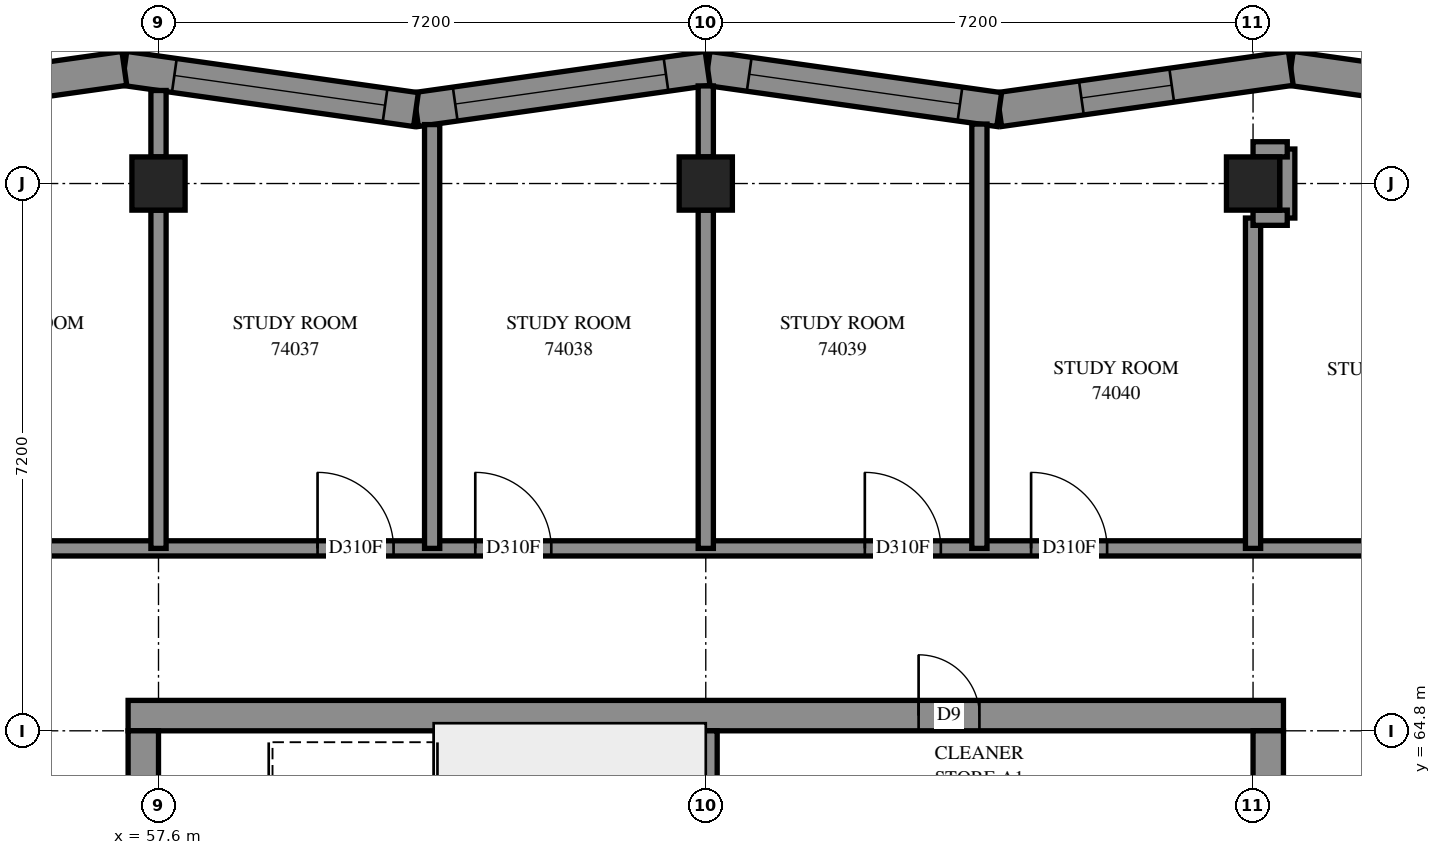
"""IFC4 building model, lengths in metres.
Left out: names, types, materials, properties, quantities, classifications, styles, units other than length and angle.
Written with IfcOpenShell. Run it as: python <this file> out.ifc"""

import sys

from ifc_helpers import new_model, si_unit, direction, frame, frame_2d, origin, origin_2d, place, context, subcontext, project, spatial, polyline, rectangle, outline, extrude, element, fill, save


model = new_model("IFC4")
c1 = context("Model", 3, precision=1e-05, world=origin(), true_north=direction((0.0, 1.0)))
c2 = subcontext(c1, "Body", "Model", "MODEL_VIEW")
j1 = project(units=[si_unit("LENGTHUNIT", "METRE"), si_unit("PLANEANGLEUNIT", "RADIAN")], contexts=[c1])
p1 = place(None, origin())
s1 = spatial("IfcSite", under=j1, at=p1, CompositionType="ELEMENT")
p2 = place(p1, origin())
s2 = spatial("IfcBuilding", under=s1, at=p2, CompositionType="ELEMENT")
p3 = place(p2, frame((0.0, 0.0, 271.0)))
s3 = spatial("IfcBuildingStorey", under=s2, at=p3, CompositionType="ELEMENT", Elevation=271.0)
for number, where, z_axis, x_axis in (
    (1, (57.6, 72.0, 0.0), (0.0, 0.0, 1.0), (1.0, 0.0, 0.0)),
    (2, (64.8, 72.0, 0.0), (0.0, 0.0, 1.0), (1.0, 0.0, 0.0)),
    (3, (72.0, 72.0, 0.0), (0.0, 0.0, 1.0), (1.0, 0.0, 0.0)),
):
    element("IfcColumn", number, at=place(p3, frame(where, z_axis=z_axis, x_axis=x_axis)), inside=s3, PredefinedType="COLUMN", context=c2, shape_type="SweptSolid", body=[
        extrude(rectangle(XDim=0.7, YDim=0.7, at=origin_2d()), origin(), (0.0, 0.0, 1.0), 3.1),
    ])
p4 = place(p3, frame((57.2, 65.0, -0.3), z_axis=(0.0, 0.0, 1.0), x_axis=(1.0, 0.0, 0.0)))
e4 = element("IfcWall", 4, at=p4, inside=s3, PredefinedType="SHEAR", context=c2, shape_type="SweptSolid", body=[
    extrude(rectangle(XDim=15.2, YDim=0.4, at=frame_2d((7.6, 0.0))), origin(), (0.0, 0.0, 1.0), 2.7),
])
p5 = place(p4, frame((10.4, 0.0, 0.3)))
e5 = element("IfcOpeningElement", 5, at=p5, cuts=e4, PredefinedType="OPENING", context=c2, shape_type="SweptSolid", body=[
    extrude(rectangle(XDim=0.8, YDim=2.1, at=frame_2d((0.4, 1.05))), frame((0.0, 0.21, 0.0), z_axis=(0.0, -1.0, 0.0), x_axis=(1.0, 0.0, 0.0)), (0.0, 0.0, 1.0), 0.42),
])
p6 = place(p3, frame((57.4, 50.4, -0.3), z_axis=(0.0, 0.0, 1.0), x_axis=(0.0, 1.0, 0.0)))
e6 = element("IfcWall", 6, at=p6, inside=s3, PredefinedType="SHEAR", context=c2, shape_type="SweptSolid", body=[
    extrude(rectangle(XDim=14.4, YDim=0.4, at=frame_2d((7.2, 0.0))), origin(), (0.0, 0.0, 1.0), 2.7),
])
p7 = place(p6, frame((4.55, 0.0, 0.3)))
e7 = element("IfcOpeningElement", 7, at=p7, cuts=e6, PredefinedType="OPENING", context=c2, shape_type="SweptSolid", body=[
    extrude(rectangle(XDim=1.1, YDim=2.1, at=frame_2d((0.55, 1.05))), frame((0.0, 0.21, 0.0), z_axis=(0.0, -1.0, 0.0), x_axis=(1.0, 0.0, 0.0)), (0.0, 0.0, 1.0), 0.42),
])
p8 = place(p6, frame((11.35, 0.0, 0.3)))
e8 = element("IfcOpeningElement", 8, at=p8, cuts=e6, PredefinedType="OPENING", context=c2, shape_type="SweptSolid", body=[
    extrude(rectangle(XDim=1.1, YDim=2.1, at=frame_2d((0.55, 1.05))), frame((0.0, 0.21, 0.0), z_axis=(0.0, -1.0, 0.0), x_axis=(1.0, 0.0, 0.0)), (0.0, 0.0, 1.0), 0.42),
])
p9 = place(p3, frame((72.2, 50.4, -0.3), z_axis=(0.0, 0.0, 1.0), x_axis=(0.0, 1.0, 0.0)))
e9 = element("IfcWall", 9, at=p9, inside=s3, PredefinedType="SHEAR", context=c2, shape_type="SweptSolid", body=[
    extrude(rectangle(XDim=14.4, YDim=0.4, at=frame_2d((7.2, 0.0))), origin(), (0.0, 0.0, 1.0), 2.7),
])
p10 = place(p9, frame((4.55, 0.0, 0.3)))
e10 = element("IfcOpeningElement", 10, at=p10, cuts=e9, PredefinedType="OPENING", context=c2, shape_type="SweptSolid", body=[
    extrude(rectangle(XDim=1.1, YDim=2.1, at=frame_2d((0.55, 1.05))), frame((0.0, 0.21, 0.0), z_axis=(0.0, -1.0, 0.0), x_axis=(1.0, 0.0, 0.0)), (0.0, 0.0, 1.0), 0.42),
])
p11 = place(p9, frame((11.35, 0.0, 0.3)))
e11 = element("IfcOpeningElement", 11, at=p11, cuts=e9, PredefinedType="OPENING", context=c2, shape_type="SweptSolid", body=[
    extrude(rectangle(XDim=1.1, YDim=2.1, at=frame_2d((0.55, 1.05))), frame((0.0, 0.21, 0.0), z_axis=(0.0, -1.0, 0.0), x_axis=(1.0, 0.0, 0.0)), (0.0, 0.0, 1.0), 0.42),
])
p12 = place(p3, frame((64.8, 60.6, 0.0), z_axis=(0.0, 0.0, 1.0), x_axis=(0.0, 1.0, 0.0)))
e12 = element("IfcWall", 12, at=p12, inside=s3, PredefinedType="SOLIDWALL", context=c2, shape_type="SweptSolid", body=[
    extrude(rectangle(XDim=4.2, YDim=0.3, at=frame_2d((2.1, 0.0))), origin(), (0.0, 0.0, 1.0), 3.1),
])
p13 = place(p3, frame((76.351, 72.97, 0.0), z_axis=(0.0, 0.0, 1.0), x_axis=(-0.9901651862, 0.1399031953, 0.0)))
e13 = element("IfcWall", 13, at=p13, inside=s3, PredefinedType="SOLIDWALL", context=c2, shape_type="SweptSolid", body=[
    extrude(outline(polyline([(0.049, -0.225), (3.924, -0.225), (3.86, 0.225), (-0.049, 0.225), (0.049, -0.225)])), origin(), (0.0, 0.0, 1.0), 3.1),
])
p14 = place(p13, frame((1.609, 0.0, 0.45)))
e14 = element("IfcOpeningElement", 14, at=p14, cuts=e13, PredefinedType="OPENING", context=c2, shape_type="SweptSolid", body=[
    extrude(rectangle(XDim=1.2, YDim=2.55, at=frame_2d((0.6, 1.275))), frame((0.0, 0.235, 0.0), z_axis=(0.0, -1.0, 0.0), x_axis=(1.0, 0.0, 0.0)), (0.0, 0.0, 1.0), 0.47),
])
p15 = place(p3, frame((72.497, 73.515, 0.0), z_axis=(0.0, 0.0, 1.0), x_axis=(-0.9901681853, -0.1398819675, 0.0)))
e15 = element("IfcWall", 15, at=p15, inside=s3, PredefinedType="SOLIDWALL", context=c2, shape_type="SweptSolid", body=[
    extrude(outline(polyline([(-0.032, -0.225), (3.843, -0.225), (3.906, 0.225), (0.032, 0.225), (-0.032, -0.225)])), origin(), (0.0, 0.0, 1.0), 3.1),
])
p16 = place(p15, frame((1.583, 0.0, 0.45)))
e16 = element("IfcOpeningElement", 16, at=p16, cuts=e15, PredefinedType="OPENING", context=c2, shape_type="SweptSolid", body=[
    extrude(rectangle(XDim=1.2, YDim=2.55, at=frame_2d((0.6, 1.275))), frame((0.0, 0.235, 0.0), z_axis=(0.0, -1.0, 0.0), x_axis=(1.0, 0.0, 0.0)), (0.0, 0.0, 1.0), 0.47),
])
p17 = place(p3, frame((68.66, 72.973, 0.0), z_axis=(0.0, 0.0, 1.0), x_axis=(-0.9901681853, 0.1398819675, 0.0)))
e17 = element("IfcWall", 17, at=p17, inside=s3, PredefinedType="SOLIDWALL", context=c2, shape_type="SweptSolid", body=[
    extrude(outline(polyline([(0.032, -0.225), (3.906, -0.225), (3.843, 0.225), (-0.032, 0.225), (0.032, -0.225)])), origin(), (0.0, 0.0, 1.0), 3.1),
])
p18 = place(p17, frame((0.521, 0.0, 0.45)))
e18 = element("IfcOpeningElement", 18, at=p18, cuts=e17, PredefinedType="OPENING", context=c2, shape_type="SweptSolid", body=[
    extrude(rectangle(XDim=2.8, YDim=2.55, at=frame_2d((1.4, 1.275))), frame((0.0, 0.235, 0.0), z_axis=(0.0, -1.0, 0.0), x_axis=(1.0, 0.0, 0.0)), (0.0, 0.0, 1.0), 0.47),
])
p19 = place(p3, frame((64.824, 73.515, 0.0), z_axis=(0.0, 0.0, 1.0), x_axis=(-0.9901681853, -0.1398819675, 0.0)))
e19 = element("IfcWall", 19, at=p19, inside=s3, PredefinedType="SOLIDWALL", context=c2, shape_type="SweptSolid", body=[
    extrude(outline(polyline([(-0.032, -0.225), (3.843, -0.225), (3.906, 0.225), (0.032, 0.225), (-0.032, -0.225)])), origin(), (0.0, 0.0, 1.0), 3.1),
])
p20 = place(p19, frame((0.553, 0.0, 0.45)))
e20 = element("IfcOpeningElement", 20, at=p20, cuts=e19, PredefinedType="OPENING", context=c2, shape_type="SweptSolid", body=[
    extrude(rectangle(XDim=2.8, YDim=2.55, at=frame_2d((1.4, 1.275))), frame((0.0, 0.235, 0.0), z_axis=(0.0, -1.0, 0.0), x_axis=(1.0, 0.0, 0.0)), (0.0, 0.0, 1.0), 0.47),
])
p21 = place(p3, frame((60.987, 72.973, 0.0), z_axis=(0.0, 0.0, 1.0), x_axis=(-0.9901681853, 0.1398819675, 0.0)))
e21 = element("IfcWall", 21, at=p21, inside=s3, PredefinedType="SOLIDWALL", context=c2, shape_type="SweptSolid", body=[
    extrude(outline(polyline([(0.032, -0.225), (3.906, -0.225), (3.843, 0.225), (-0.032, 0.225), (0.032, -0.225)])), origin(), (0.0, 0.0, 1.0), 3.1),
])
p22 = place(p21, frame((0.41, 0.0, 0.45)))
e22 = element("IfcOpeningElement", 22, at=p22, cuts=e21, PredefinedType="OPENING", context=c2, shape_type="SweptSolid", body=[
    extrude(rectangle(XDim=2.8, YDim=2.55, at=frame_2d((1.4, 1.275))), frame((0.0, 0.235, 0.0), z_axis=(0.0, -1.0, 0.0), x_axis=(1.0, 0.0, 0.0)), (0.0, 0.0, 1.0), 0.47),
])
p23 = place(p3, frame((57.151, 73.515, 0.0), z_axis=(0.0, 0.0, 1.0), x_axis=(-0.9901676803, -0.1398855422, 0.0)))
e23 = element("IfcWall", 23, at=p23, inside=s3, PredefinedType="SOLIDWALL", context=c2, shape_type="SweptSolid", body=[
    extrude(outline(polyline([(-0.032, -0.225), (3.843, -0.225), (3.906, 0.225), (0.032, 0.225), (-0.032, -0.225)])), origin(), (0.0, 0.0, 1.0), 3.1),
])
p24 = place(p23, frame((1.107, 0.0, 0.45)))
e24 = element("IfcOpeningElement", 24, at=p24, cuts=e23, PredefinedType="OPENING", context=c2, shape_type="SweptSolid", body=[
    extrude(rectangle(XDim=1.2, YDim=2.55, at=frame_2d((0.6, 1.275))), frame((0.0, 0.235, 0.0), z_axis=(0.0, -1.0, 0.0), x_axis=(1.0, 0.0, 0.0)), (0.0, 0.0, 1.0), 0.47),
])
p25 = place(p3, frame((55.2, 67.2, 0.0), z_axis=(0.0, 0.0, 1.0), x_axis=(1.0, 0.0, 0.0)))
e25 = element("IfcWall", 25, at=p25, inside=s3, PredefinedType="PARTITIONING", context=c2, shape_type="SweptSolid", body=[
    extrude(rectangle(XDim=19.2, YDim=0.2, at=frame_2d((9.6, 0.0))), origin(), (0.0, 0.0, 1.0), 3.1),
])
p26 = place(p25, frame((4.492, 0.0, 0.0)))
e26 = element("IfcOpeningElement", 26, at=p26, cuts=e25, PredefinedType="OPENING", context=c2, shape_type="SweptSolid", body=[
    extrude(rectangle(XDim=1.0, YDim=2.1, at=frame_2d((0.5, 1.05))), frame((0.0, 0.11, 0.0), z_axis=(0.0, -1.0, 0.0), x_axis=(1.0, 0.0, 0.0)), (0.0, 0.0, 1.0), 0.22),
])
p27 = place(p25, frame((6.567, 0.0, 0.0)))
e27 = element("IfcOpeningElement", 27, at=p27, cuts=e25, PredefinedType="OPENING", context=c2, shape_type="SweptSolid", body=[
    extrude(rectangle(XDim=1.0, YDim=2.1, at=frame_2d((0.5, 1.05))), frame((0.0, 0.11, 0.0), z_axis=(0.0, -1.0, 0.0), x_axis=(1.0, 0.0, 0.0)), (0.0, 0.0, 1.0), 0.22),
])
p28 = place(p25, frame((11.693, 0.0, 0.0)))
e28 = element("IfcOpeningElement", 28, at=p28, cuts=e25, PredefinedType="OPENING", context=c2, shape_type="SweptSolid", body=[
    extrude(rectangle(XDim=1.0, YDim=2.1, at=frame_2d((0.5, 1.05))), frame((0.0, 0.11, 0.0), z_axis=(0.0, -1.0, 0.0), x_axis=(1.0, 0.0, 0.0)), (0.0, 0.0, 1.0), 0.22),
])
p29 = place(p25, frame((13.88, 0.0, 0.0)))
e29 = element("IfcOpeningElement", 29, at=p29, cuts=e25, PredefinedType="OPENING", context=c2, shape_type="SweptSolid", body=[
    extrude(rectangle(XDim=1.0, YDim=2.1, at=frame_2d((0.5, 1.05))), frame((0.0, 0.11, 0.0), z_axis=(0.0, -1.0, 0.0), x_axis=(1.0, 0.0, 0.0)), (0.0, 0.0, 1.0), 0.22),
])
p30 = place(p3, frame((68.4, 67.2, 0.0), z_axis=(0.0, 0.0, 1.0), x_axis=(0.0, 1.0, 0.0)))
e30 = element("IfcWall", 30, at=p30, inside=s3, PredefinedType="PARTITIONING", context=c2, shape_type="SweptSolid", body=[
    extrude(rectangle(XDim=5.582, YDim=0.2, at=frame_2d((2.791, 0.0))), origin(), (0.0, 0.0, 1.0), 3.1),
])
p31 = place(p3, frame((61.2, 67.2, 0.0), z_axis=(0.0, 0.0, 1.0), x_axis=(0.0, 1.0, 0.0)))
e31 = element("IfcWall", 31, at=p31, inside=s3, PredefinedType="PARTITIONING", context=c2, shape_type="SweptSolid", body=[
    extrude(rectangle(XDim=5.576, YDim=0.2, at=frame_2d((2.788, 0.0))), origin(), (0.0, 0.0, 1.0), 3.1),
])
for number, where, z_axis, x_axis in (
    (32, (57.6, 67.2, 0.0), (0.0, 0.0, 1.0), (0.0, 1.0, 0.0)),
    (33, (64.8, 67.2, 0.0), (0.0, 0.0, 1.0), (0.0, 1.0, 0.0)),
):
    element("IfcWall", number, at=place(p3, frame(where, z_axis=z_axis, x_axis=x_axis)), inside=s3, PredefinedType="PARTITIONING", context=c2, shape_type="SweptSolid", body=[
        extrude(rectangle(XDim=4.45, YDim=0.2, at=frame_2d((2.225, 0.0))), origin(), (0.0, 0.0, 1.0), 3.1),
    ])
p32 = place(p3, frame((72.0, 67.2, 0.0), z_axis=(0.0, 0.0, 1.0), x_axis=(0.0, 1.0, 0.0)))
e34 = element("IfcWall", 34, at=p32, inside=s3, PredefinedType="PARTITIONING", context=c2, shape_type="SweptSolid", body=[
    extrude(rectangle(XDim=4.346, YDim=0.2, at=frame_2d((2.173, 0.0))), origin(), (0.0, 0.0, 1.0), 3.1),
])
p33 = place(p3, frame((72.45, 71.546, 0.0), z_axis=(0.0, 0.0, 1.0), x_axis=(0.0, 1.0, 0.0)))
e35 = element("IfcWall", 35, at=p33, inside=s3, PredefinedType="PARTITIONING", context=c2, shape_type="SweptSolid", body=[
    extrude(rectangle(XDim=0.908, YDim=0.2, at=frame_2d((0.454, 0.0))), origin(), (0.0, 0.0, 1.0), 3.1),
])
p34 = place(p3, frame((64.8, 72.35, 0.0), z_axis=(0.0, 0.0, 1.0), x_axis=(0.0, 1.0, 0.0)))
e36 = element("IfcWall", 36, at=p34, inside=s3, PredefinedType="PARTITIONING", context=c2, shape_type="SweptSolid", body=[
    extrude(rectangle(XDim=0.934, YDim=0.2, at=frame_2d((0.467, 0.0))), origin(), (0.0, 0.0, 1.0), 3.1),
])
p35 = place(p3, frame((57.6, 72.35, 0.0), z_axis=(0.0, 0.0, 1.0), x_axis=(0.0, 1.0, 0.0)))
e37 = element("IfcWall", 37, at=p35, inside=s3, PredefinedType="PARTITIONING", context=c2, shape_type="SweptSolid", body=[
    extrude(rectangle(XDim=0.874, YDim=0.2, at=frame_2d((0.437, 0.0))), origin(), (0.0, 0.0, 1.0), 3.1),
])
for number, where, z_axis, x_axis in (
    (38, (72.0, 71.55, 0.0), (0.0, 0.0, 1.0), (1.0, 0.0, 0.0)),
    (39, (72.0, 72.45, 0.0), (0.0, 0.0, 1.0), (1.0, 0.0, 0.0)),
):
    element("IfcWall", number, at=place(p3, frame(where, z_axis=z_axis, x_axis=x_axis)), inside=s3, PredefinedType="PARTITIONING", context=c2, shape_type="SweptSolid", body=[
        extrude(rectangle(XDim=0.45, YDim=0.2, at=frame_2d((0.225, 0.0))), origin(), (0.0, 0.0, 1.0), 3.1),
    ])
p36 = place(p18, origin())
e40 = element("IfcWindow", 40, at=p36, inside=s3, PartitioningType="SINGLE_PANEL", PredefinedType="WINDOW", context=c2, shape_type="SweptSolid", body=[
    extrude(rectangle(XDim=2.8, YDim=2.55, at=frame_2d((1.4, 1.275))), frame((0.0, 0.205, 0.0), z_axis=(0.0, -1.0, 0.0), x_axis=(1.0, 0.0, 0.0)), (0.0, 0.0, 1.0), 0.06),
])
fill(e18, e40)
p37 = place(p20, origin())
e41 = element("IfcWindow", 41, at=p37, inside=s3, PartitioningType="SINGLE_PANEL", PredefinedType="WINDOW", context=c2, shape_type="SweptSolid", body=[
    extrude(rectangle(XDim=2.8, YDim=2.55, at=frame_2d((1.4, 1.275))), frame((0.0, 0.205, 0.0), z_axis=(0.0, -1.0, 0.0), x_axis=(1.0, 0.0, 0.0)), (0.0, 0.0, 1.0), 0.06),
])
fill(e20, e41)
p38 = place(p22, origin())
e42 = element("IfcWindow", 42, at=p38, inside=s3, PartitioningType="SINGLE_PANEL", PredefinedType="WINDOW", context=c2, shape_type="SweptSolid", body=[
    extrude(rectangle(XDim=2.8, YDim=2.55, at=frame_2d((1.4, 1.275))), frame((0.0, 0.205, 0.0), z_axis=(0.0, -1.0, 0.0), x_axis=(1.0, 0.0, 0.0)), (0.0, 0.0, 1.0), 0.06),
])
fill(e22, e42)
p39 = place(p5, origin())
e43 = element("IfcDoor", 43, at=p39, inside=s3, OperationType="SINGLE_SWING_RIGHT", PredefinedType="DOOR", context=c2, shape_type="SweptSolid", body=[
    extrude(rectangle(XDim=0.8, YDim=2.1, at=frame_2d((0.4, 1.05))), frame((0.0, 0.025, 0.0), z_axis=(0.0, -1.0, 0.0), x_axis=(1.0, 0.0, 0.0)), (0.0, 0.0, 1.0), 0.05),
])
fill(e5, e43)
p40 = place(p26, origin())
e44 = element("IfcDoor", 44, at=p40, inside=s3, OperationType="SINGLE_SWING_RIGHT", PredefinedType="DOOR", context=c2, shape_type="SweptSolid", body=[
    extrude(rectangle(XDim=1.0, YDim=2.1, at=frame_2d((0.5, 1.05))), frame((0.0, 0.025, 0.0), z_axis=(0.0, -1.0, 0.0), x_axis=(1.0, 0.0, 0.0)), (0.0, 0.0, 1.0), 0.05),
])
fill(e26, e44)
p41 = place(p27, origin())
e45 = element("IfcDoor", 45, at=p41, inside=s3, OperationType="SINGLE_SWING_LEFT", PredefinedType="DOOR", context=c2, shape_type="SweptSolid", body=[
    extrude(rectangle(XDim=1.0, YDim=2.1, at=frame_2d((0.5, 1.05))), frame((0.0, 0.025, 0.0), z_axis=(0.0, -1.0, 0.0), x_axis=(1.0, 0.0, 0.0)), (0.0, 0.0, 1.0), 0.05),
])
fill(e27, e45)
p42 = place(p28, origin())
e46 = element("IfcDoor", 46, at=p42, inside=s3, OperationType="SINGLE_SWING_RIGHT", PredefinedType="DOOR", context=c2, shape_type="SweptSolid", body=[
    extrude(rectangle(XDim=1.0, YDim=2.1, at=frame_2d((0.5, 1.05))), frame((0.0, 0.025, 0.0), z_axis=(0.0, -1.0, 0.0), x_axis=(1.0, 0.0, 0.0)), (0.0, 0.0, 1.0), 0.05),
])
fill(e28, e46)
p43 = place(p29, origin())
e47 = element("IfcDoor", 47, at=p43, inside=s3, OperationType="SINGLE_SWING_LEFT", PredefinedType="DOOR", context=c2, shape_type="SweptSolid", body=[
    extrude(rectangle(XDim=1.0, YDim=2.1, at=frame_2d((0.5, 1.05))), frame((0.0, 0.025, 0.0), z_axis=(0.0, -1.0, 0.0), x_axis=(1.0, 0.0, 0.0)), (0.0, 0.0, 1.0), 0.05),
])
fill(e29, e47)
p44 = place(p16, origin())
e48 = element("IfcWindow", 48, at=p44, inside=s3, PartitioningType="SINGLE_PANEL", PredefinedType="WINDOW", context=c2, shape_type="SweptSolid", body=[
    extrude(rectangle(XDim=1.2, YDim=2.55, at=frame_2d((0.6, 1.275))), frame((0.0, 0.205, 0.0), z_axis=(0.0, -1.0, 0.0), x_axis=(1.0, 0.0, 0.0)), (0.0, 0.0, 1.0), 0.06),
])
fill(e16, e48)
save(model, sys.argv[1])
